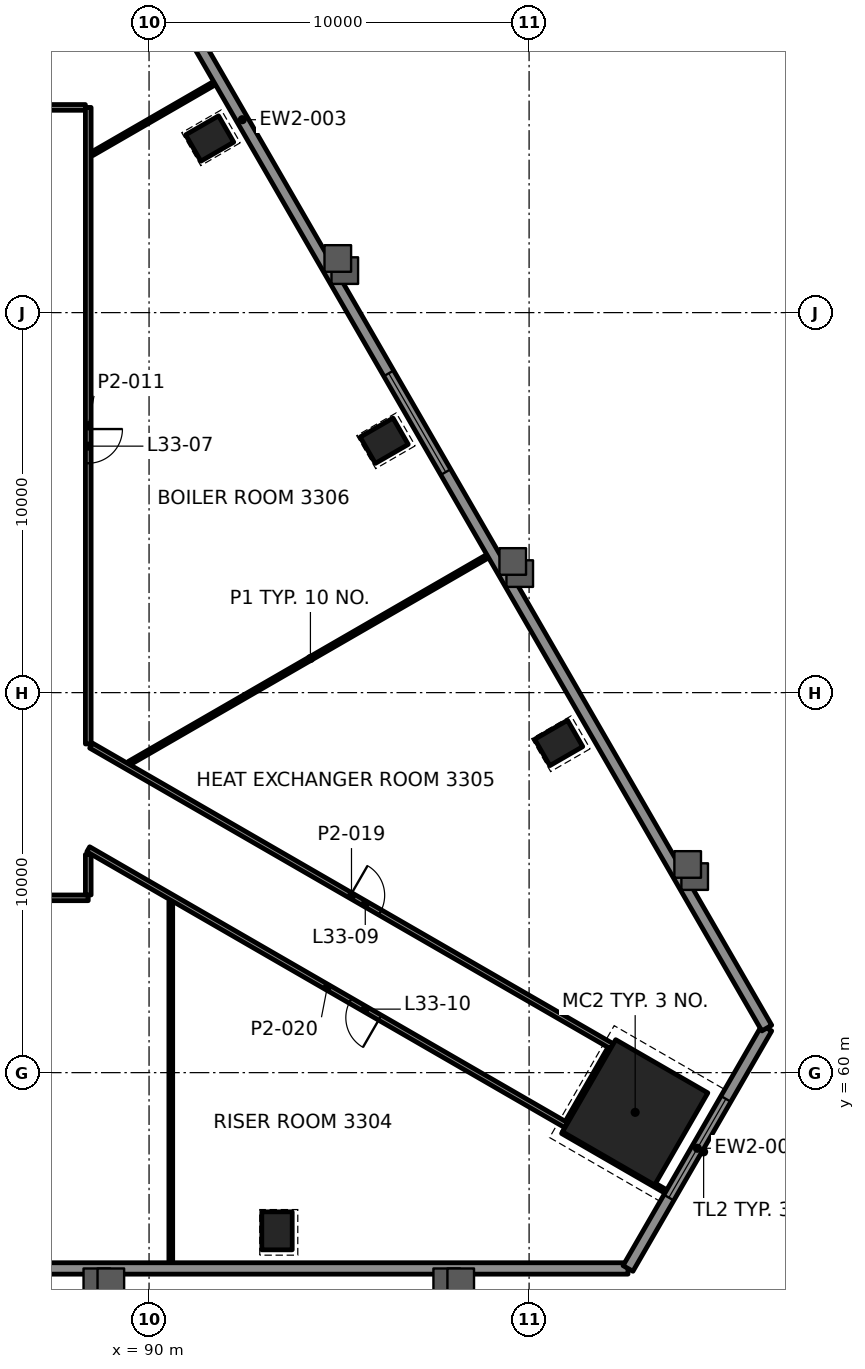
"""IFC4 building model, lengths in metres.
Left out: names, types, materials, properties, quantities, classifications, styles, units other than length and angle.
Written with IfcOpenShell. Run it as: python <this file> out.ifc"""

import sys

from ifc_helpers import new_model, si_unit, direction, frame, frame_2d, origin, origin_2d, place, context, subcontext, project, spatial, rectangle, hollow_rectangle, extrude, element, fill, save


model = new_model("IFC4")
c1 = context("Model", 3, precision=1e-05, world=origin(), true_north=direction((0.0, 1.0)))
c2 = subcontext(c1, "Body", "Model", "MODEL_VIEW")
j1 = project(units=[si_unit("LENGTHUNIT", "METRE"), si_unit("PLANEANGLEUNIT", "RADIAN")], contexts=[c1])
p1 = place(None, origin())
s1 = spatial("IfcSite", under=j1, at=p1, CompositionType="ELEMENT")
p2 = place(p1, origin())
s2 = spatial("IfcBuilding", under=s1, at=p2, CompositionType="ELEMENT")
p3 = place(p2, frame((0.0, 0.0, 146.8)))
s3 = spatial("IfcBuildingStorey", under=s2, at=p3, CompositionType="ELEMENT", Elevation=146.8)
p4 = place(p3, frame((102.791, 58.955, 0.0), z_axis=(0.0, 0.0, 1.0), x_axis=(0.5, 0.866025403784, 0.0)))
e1 = element("IfcColumn", 1, at=p4, inside=s3, PredefinedType="COLUMN", context=c2, shape_type="SweptSolid", body=[
    extrude(rectangle(XDim=2.8, YDim=2.8, at=origin_2d()), origin(), (0.0, 0.0, 1.0), 4.5),
])
for number, where, z_axis, x_axis in (
    (2, (93.367, 55.837, -0.0), (0.0, 0.0, 1.0), (1.0, 0.0, 0.0)),
    (3, (100.779, 68.676, -0.0), (0.0, 0.0, 1.0), (-0.5, 0.866, 0.0)),
    (4, (96.187, 76.628, -0.0), (0.0, 0.0, 1.0), (-0.5, 0.866, 0.0)),
    (5, (91.595, 84.582, -0.0), (0.0, 0.0, 1.0), (-0.5, 0.866, 0.0)),
):
    element("IfcColumn", number, at=place(p3, frame(where, z_axis=z_axis, x_axis=x_axis)), inside=s3, PredefinedType="COLUMN", context=c2, shape_type="SweptSolid", body=[
        extrude(hollow_rectangle(XDim=0.8, YDim=1.0, WallThickness=0.05, at=origin_2d()), origin(), (0.0, 0.0, 1.0), 4.5),
    ])
p5 = place(p3, frame((88.399, 64.6, 0.0), z_axis=(0.0, 0.0, 1.0), x_axis=(-1.0, 0.0, 0.0)))
e6 = element("IfcWall", 6, at=p5, inside=s3, PredefinedType="PARTITIONING", context=c2, shape_type="SweptSolid", body=[
    extrude(rectangle(XDim=26.799, YDim=0.15, at=frame_2d((13.399, 0.0))), origin(), (0.0, 0.0, 1.0), 3.45),
])
p6 = place(p5, frame((12.8, 0.0, 0.0)))
e7 = element("IfcOpeningElement", 7, at=p6, cuts=e6, PredefinedType="OPENING", context=c2, shape_type="SweptSolid", body=[
    extrude(rectangle(XDim=1.2, YDim=2.1, at=frame_2d((0.6, 1.05))), frame((0.0, 0.085, 0.0), z_axis=(0.0, -1.0, 0.0), x_axis=(1.0, 0.0, 0.0)), (0.0, 0.0, 1.0), 0.17),
])
p7 = place(p3, frame((80.675, 85.4, 0.0), z_axis=(0.0, 0.0, 1.0), x_axis=(1.0, 0.0, 0.0)))
e8 = element("IfcWall", 8, at=p7, inside=s3, PredefinedType="PARTITIONING", context=c2, shape_type="SweptSolid", body=[
    extrude(rectangle(XDim=7.649, YDim=0.15, at=frame_2d((3.825, 0.0))), origin(), (0.0, 0.0, 1.0), 3.45),
])
p8 = place(p7, frame((3.225, 0.0, 0.0)))
e9 = element("IfcOpeningElement", 9, at=p8, cuts=e8, PredefinedType="OPENING", context=c2, shape_type="SweptSolid", body=[
    extrude(rectangle(XDim=1.2, YDim=2.1, at=frame_2d((0.6, 1.05))), frame((0.0, 0.085, 0.0), z_axis=(0.0, -1.0, 0.0), x_axis=(1.0, 0.0, 0.0)), (0.0, 0.0, 1.0), 0.17),
])
p9 = place(p3, frame((89.477, 68.144, 0.0), z_axis=(0.0, 0.0, 1.0), x_axis=(0.866019096966, 0.500010923571, 0.0)))
e10 = element("IfcWall", 10, at=p9, inside=s3, PredefinedType="PARTITIONING", context=c2, shape_type="SweptSolid", body=[
    extrude(rectangle(XDim=11.013, YDim=0.1, at=frame_2d((5.507, 0.0))), origin(), (0.0, 0.0, 1.0), 3.215),
])
p10 = place(p3, frame((88.5, 84.179, 0.0), z_axis=(0.0, 0.0, 1.0), x_axis=(0.866013078485, 0.500021347437, 0.0)))
e11 = element("IfcWall", 11, at=p10, inside=s3, PredefinedType="PARTITIONING", context=c2, shape_type="SweptSolid", body=[
    extrude(rectangle(XDim=3.842, YDim=0.1, at=frame_2d((1.921, 0.0))), origin(), (0.0, 0.0, 1.0), 3.215),
])
p11 = place(p3, frame((101.019, 58.686, 0.0), z_axis=(0.0, 0.0, 1.0), x_axis=(0.500070929363, 0.865984448825, 0.0)))
e12 = element("IfcWall", 12, at=p11, inside=s3, PredefinedType="PARTITIONING", context=c2, shape_type="SweptSolid", body=[
    extrude(rectangle(XDim=2.244, YDim=0.15, at=frame_2d((1.122, 0.0))), origin(), (0.0, 0.0, 1.0), 3.297),
])
p12 = place(p3, frame((90.572, 54.877, 0.0), z_axis=(0.0, 0.0, 1.0), x_axis=(0.0, 1.0, 0.0)))
e13 = element("IfcWall", 13, at=p12, inside=s3, PredefinedType="PARTITIONING", context=c2, shape_type="SweptSolid", body=[
    extrude(rectangle(XDim=9.63, YDim=0.1, at=frame_2d((4.815, 0.0))), origin(), (0.0, 0.0, 1.0), 3.215),
])
p13 = place(p3, frame((88.4, 64.676, 0.0), z_axis=(0.0, 0.0, 1.0), x_axis=(0.0, 1.0, 0.0)))
e14 = element("IfcWall", 14, at=p13, inside=s3, PredefinedType="PARTITIONING", context=c2, shape_type="SweptSolid", body=[
    extrude(rectangle(XDim=1.066, YDim=0.15, at=frame_2d((0.533, 0.0))), origin(), (0.0, 0.0, 1.0), 3.297),
])
p14 = place(p3, frame((88.4, 85.399, 0.0), z_axis=(0.0, 0.0, 1.0), x_axis=(0.0, -1.0, 0.0)))
e15 = element("IfcWall", 15, at=p14, inside=s3, PredefinedType="PARTITIONING", context=c2, shape_type="SweptSolid", body=[
    extrude(rectangle(XDim=16.75, YDim=0.15, at=frame_2d((8.375, 0.0))), origin(), (0.0, 0.0, 1.0), 3.45),
])
p15 = place(p14, frame((8.463, 0.0, 0.0)))
e16 = element("IfcOpeningElement", 16, at=p15, cuts=e15, PredefinedType="OPENING", context=c2, shape_type="SweptSolid", body=[
    extrude(rectangle(XDim=0.9, YDim=2.1, at=frame_2d((0.45, 1.05))), frame((0.0, 0.085, 0.0), z_axis=(0.0, -1.0, 0.0), x_axis=(1.0, 0.0, 0.0)), (0.0, 0.0, 1.0), 0.17),
])
p16 = place(p3, frame((88.475, 68.606, 0.0), z_axis=(0.0, 0.0, 1.0), x_axis=(0.866022169491, -0.500005601919, 0.0)))
e17 = element("IfcWall", 17, at=p16, inside=s3, PredefinedType="PARTITIONING", context=c2, shape_type="SweptSolid", body=[
    extrude(rectangle(XDim=15.823, YDim=0.15, at=frame_2d((7.912, 0.0))), origin(), (0.0, 0.0, 1.0), 3.45),
])
p17 = place(p16, frame((7.88, 0.0, 0.0)))
e18 = element("IfcOpeningElement", 18, at=p17, cuts=e17, PredefinedType="OPENING", context=c2, shape_type="SweptSolid", body=[
    extrude(rectangle(XDim=0.9, YDim=2.1, at=frame_2d((0.45, 1.05))), frame((0.0, 0.085, 0.0), z_axis=(0.0, -1.0, 0.0), x_axis=(1.0, 0.0, 0.0)), (0.0, 0.0, 1.0), 0.17),
])
p18 = place(p3, frame((100.979, 58.616, 0.0), z_axis=(0.0, 0.0, 1.0), x_axis=(-0.866027154752, 0.499996967223, 0.0)))
e19 = element("IfcWall", 19, at=p18, inside=s3, PredefinedType="PARTITIONING", context=c2, shape_type="SweptSolid", body=[
    extrude(rectangle(XDim=14.524, YDim=0.15, at=frame_2d((7.262, 0.0))), origin(), (0.0, 0.0, 1.0), 3.297),
])
p19 = place(p18, frame((5.66, 0.0, 0.0)))
e20 = element("IfcOpeningElement", 20, at=p19, cuts=e19, PredefinedType="OPENING", context=c2, shape_type="SweptSolid", body=[
    extrude(rectangle(XDim=0.9, YDim=2.1, at=frame_2d((0.45, 1.05))), frame((0.0, 0.085, 0.0), z_axis=(0.0, -1.0, 0.0), x_axis=(1.0, 0.0, 0.0)), (0.0, 0.0, 1.0), 0.17),
])
p20 = place(p3, frame((103.7, 56.813, 0.0), z_axis=(0.0, 0.0, 1.0), x_axis=(-0.866034567317, 0.49998412796, 0.0)))
e21 = element("IfcWall", 21, at=p20, inside=s3, PredefinedType="PARTITIONING", context=c2, shape_type="SweptSolid", body=[
    extrude(rectangle(XDim=3.257, YDim=0.1, at=frame_2d((1.629, 0.0))), origin(), (0.0, 0.0, 1.0), 3.45),
])
p21 = place(p3, frame((47.398, 54.847, 0.0), z_axis=(0.0, 0.0, 1.0), x_axis=(1.0, 0.0, 0.0)))
e22 = element("IfcWall", 22, at=p21, inside=s3, PredefinedType="SOLIDWALL", context=c2, shape_type="SweptSolid", body=[
    extrude(rectangle(XDim=55.204, YDim=0.3, at=frame_2d((27.602, 0.0))), origin(), (0.0, 0.0, 1.0), 4.05),
])
p22 = place(p21, frame((16.895, 0.0, 0.8)))
e23 = element("IfcOpeningElement", 23, at=p22, cuts=e22, PredefinedType="OPENING", context=c2, shape_type="SweptSolid", body=[
    extrude(rectangle(XDim=3.0, YDim=2.4, at=frame_2d((1.5, 1.2))), frame((0.0, 0.16, 0.0), z_axis=(0.0, -1.0, 0.0), x_axis=(1.0, 0.0, 0.0)), (0.0, 0.0, 1.0), 0.32),
])
p23 = place(p21, frame((35.309, 0.0, 0.8)))
e24 = element("IfcOpeningElement", 24, at=p23, cuts=e22, PredefinedType="OPENING", context=c2, shape_type="SweptSolid", body=[
    extrude(rectangle(XDim=3.0, YDim=2.4, at=frame_2d((1.5, 1.2))), frame((0.0, 0.16, 0.0), z_axis=(0.0, -1.0, 0.0), x_axis=(1.0, 0.0, 0.0)), (0.0, 0.0, 1.0), 0.32),
])
p24 = place(p3, frame((102.602, 54.847, 0.0), z_axis=(0.0, 0.0, 1.0), x_axis=(0.500000231294, 0.866025270247, 0.0)))
e25 = element("IfcWall", 25, at=p24, inside=s3, PredefinedType="SOLIDWALL", context=c2, shape_type="SweptSolid", body=[
    extrude(rectangle(XDim=7.304, YDim=0.3, at=frame_2d((3.652, 0.0))), origin(), (0.0, 0.0, 1.0), 4.05),
])
p25 = place(p24, frame((2.152, 0.0, 0.8)))
e26 = element("IfcOpeningElement", 26, at=p25, cuts=e25, PredefinedType="OPENING", context=c2, shape_type="SweptSolid", body=[
    extrude(rectangle(XDim=3.0, YDim=2.4, at=frame_2d((1.5, 1.2))), frame((0.0, 0.16, 0.0), z_axis=(0.0, -1.0, 0.0), x_axis=(1.0, 0.0, 0.0)), (0.0, 0.0, 1.0), 0.32),
])
p26 = place(p3, frame((106.254, 61.172, 0.0), z_axis=(0.0, 0.0, 1.0), x_axis=(-0.500000383388, 0.866025182435, 0.0)))
e27 = element("IfcWall", 27, at=p26, inside=s3, PredefinedType="SOLIDWALL", context=c2, shape_type="SweptSolid", body=[
    extrude(rectangle(XDim=55.204, YDim=0.3, at=frame_2d((27.602, 0.0))), origin(), (0.0, 0.0, 1.0), 4.05),
])
p27 = place(p26, frame((16.895, 0.0, 0.8)))
e28 = element("IfcOpeningElement", 28, at=p27, cuts=e27, PredefinedType="OPENING", context=c2, shape_type="SweptSolid", body=[
    extrude(rectangle(XDim=3.0, YDim=2.4, at=frame_2d((1.5, 1.2))), frame((0.0, 0.16, 0.0), z_axis=(0.0, -1.0, 0.0), x_axis=(1.0, 0.0, 0.0)), (0.0, 0.0, 1.0), 0.32),
])
p28 = place(p26, frame((35.309, 0.0, 0.8)))
e29 = element("IfcOpeningElement", 29, at=p28, cuts=e27, PredefinedType="OPENING", context=c2, shape_type="SweptSolid", body=[
    extrude(rectangle(XDim=3.0, YDim=2.4, at=frame_2d((1.5, 1.2))), frame((0.0, 0.16, 0.0), z_axis=(0.0, -1.0, 0.0), x_axis=(1.0, 0.0, 0.0)), (0.0, 0.0, 1.0), 0.32),
])
p29 = place(p15, origin())
e30 = element("IfcDoor", 30, at=p29, inside=s3, OperationType="SINGLE_SWING_RIGHT", PredefinedType="DOOR", context=c2, shape_type="SweptSolid", body=[
    extrude(rectangle(XDim=0.9, YDim=2.1, at=frame_2d((0.45, 1.05))), frame((0.0, 0.025, 0.0), z_axis=(0.0, -1.0, 0.0), x_axis=(1.0, 0.0, 0.0)), (0.0, 0.0, 1.0), 0.05),
])
fill(e16, e30)
p30 = place(p17, origin())
e31 = element("IfcDoor", 31, at=p30, inside=s3, OperationType="SINGLE_SWING_LEFT", PredefinedType="DOOR", context=c2, shape_type="SweptSolid", body=[
    extrude(rectangle(XDim=0.9, YDim=2.1, at=frame_2d((0.45, 1.05))), frame((0.0, 0.025, 0.0), z_axis=(0.0, -1.0, 0.0), x_axis=(1.0, 0.0, 0.0)), (0.0, 0.0, 1.0), 0.05),
])
fill(e18, e31)
p31 = place(p19, origin())
e32 = element("IfcDoor", 32, at=p31, inside=s3, OperationType="SINGLE_SWING_LEFT", PredefinedType="DOOR", context=c2, shape_type="SweptSolid", body=[
    extrude(rectangle(XDim=0.9, YDim=2.1, at=frame_2d((0.45, 1.05))), frame((0.0, 0.025, 0.0), z_axis=(0.0, -1.0, 0.0), x_axis=(1.0, 0.0, 0.0)), (0.0, 0.0, 1.0), 0.05),
])
fill(e20, e32)
p32 = place(p25, origin())
e33 = element("IfcWindow", 33, at=p32, inside=s3, PartitioningType="SINGLE_PANEL", PredefinedType="WINDOW", context=c2, shape_type="SweptSolid", body=[
    extrude(rectangle(XDim=3.0, YDim=2.4, at=frame_2d((1.5, 1.2))), frame((0.0, 0.03, 0.0), z_axis=(0.0, -1.0, 0.0), x_axis=(1.0, 0.0, 0.0)), (0.0, 0.0, 1.0), 0.06),
])
fill(e26, e33)
p33 = place(p27, origin())
e34 = element("IfcWindow", 34, at=p33, inside=s3, PartitioningType="SINGLE_PANEL", PredefinedType="WINDOW", context=c2, shape_type="SweptSolid", body=[
    extrude(rectangle(XDim=3.0, YDim=2.4, at=frame_2d((1.5, 1.2))), frame((0.0, 0.03, 0.0), z_axis=(0.0, -1.0, 0.0), x_axis=(1.0, 0.0, 0.0)), (0.0, 0.0, 1.0), 0.06),
])
fill(e28, e34)
save(model, sys.argv[1])
